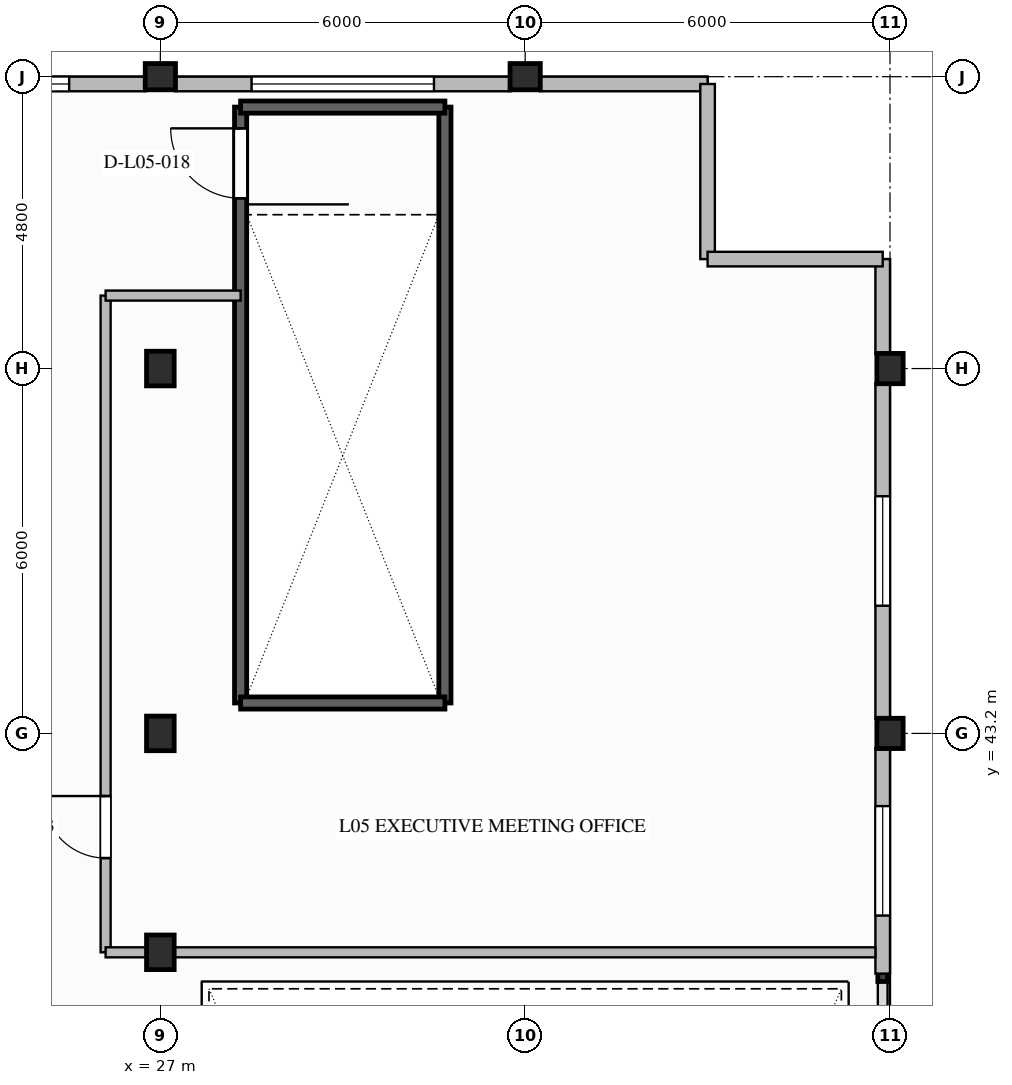
"""IFC4 building model, lengths in metres.
Left out: names, types, materials, properties, quantities, classifications, styles, units other than length and angle.
Written with IfcOpenShell. Run it as: python <this file> out.ifc"""

import sys

from ifc_helpers import new_model, si_unit, direction, frame, frame_2d, origin, origin_2d, place, context, subcontext, project, spatial, rectangle, i_section, extrude, element, fill, save


model = new_model("IFC4")
c1 = context("Model", 3, precision=1e-05, world=origin(), true_north=direction((0.0, 1.0)))
c2 = subcontext(c1, "Body", "Model", "MODEL_VIEW")
j1 = project(units=[si_unit("LENGTHUNIT", "METRE"), si_unit("PLANEANGLEUNIT", "RADIAN")], contexts=[c1])
p1 = place(None, origin())
s1 = spatial("IfcSite", under=j1, at=p1, CompositionType="ELEMENT")
p2 = place(p1, origin())
s2 = spatial("IfcBuilding", under=s1, at=p2, CompositionType="ELEMENT")
p3 = place(p2, frame((0.0, 0.0, 27.6)))
s3 = spatial("IfcBuildingStorey", under=s2, at=p3, CompositionType="ELEMENT", Elevation=27.6)
for number, where, z_axis, x_axis in (
    (1, (39.0, 43.2, 0.0), (0.0, 0.0, 1.0), (1.0, 0.0, 0.0)),
    (2, (39.0, 49.2, 0.0), (0.0, 0.0, 1.0), (1.0, 0.0, 0.0)),
    (3, (27.0, 54.0, 0.0), (0.0, 0.0, 1.0), (0.0, 1.0, 0.0)),
    (4, (33.0, 54.0, 0.0), (0.0, 0.0, 1.0), (0.0, 1.0, 0.0)),
):
    element("IfcColumn", number, at=place(p3, frame(where, z_axis=z_axis, x_axis=x_axis)), inside=s3, PredefinedType="COLUMN", context=c2, shape_type="SweptSolid", body=[
        extrude(i_section(OverallWidth=0.432, OverallDepth=0.498, WebThickness=0.056, FlangeThickness=0.089, FilletRadius=0.03, at=origin_2d()), origin(), (0.0, 0.0, 1.0), 5.32),
    ])
for number, where, z_axis, x_axis in (
    (5, (27.0, 39.6, 0.0), (0.0, 0.0, 1.0), (1.0, 0.0, 0.0)),
    (6, (27.0, 43.2, 0.0), (0.0, 0.0, 1.0), (1.0, 0.0, 0.0)),
    (7, (27.0, 49.2, 0.0), (0.0, 0.0, 1.0), (1.0, 0.0, 0.0)),
):
    element("IfcColumn", number, at=place(p3, frame(where, z_axis=z_axis, x_axis=x_axis)), inside=s3, PredefinedType="COLUMN", context=c2, shape_type="SweptSolid", body=[
        extrude(i_section(OverallWidth=0.454, OverallDepth=0.569, WebThickness=0.078, FlangeThickness=0.125, FilletRadius=0.03, at=origin_2d()), origin(), (0.0, 0.0, 1.0), 5.32),
    ])
p4 = place(p3, frame((38.88, 42.959, 0.0), z_axis=(0.0, 0.0, 1.0), x_axis=(0.0, -1.0, 0.0)))
e8 = element("IfcWall", 8, at=p4, inside=s3, PredefinedType="STANDARD", context=c2, shape_type="SweptSolid", body=[
    extrude(rectangle(XDim=3.709, YDim=0.24, at=frame_2d((1.854, 0.0))), origin(), (0.0, 0.0, 1.0), 4.625),
])
p5 = place(p4, frame((0.955, 0.0, 0.85)))
e9 = element("IfcOpeningElement", 9, at=p5, cuts=e8, PredefinedType="OPENING", context=c2, shape_type="SweptSolid", body=[
    extrude(rectangle(XDim=1.8, YDim=2.2, at=frame_2d((0.9, 1.1))), frame((0.0, 0.13, 0.0), z_axis=(0.0, -1.0, 0.0), x_axis=(1.0, 0.0, 0.0)), (0.0, 0.0, 1.0), 0.26),
])
p6 = place(p3, frame((38.88, 48.959, 0.0), z_axis=(0.0, 0.0, 1.0), x_axis=(0.0, -1.0, 0.0)))
e10 = element("IfcWall", 10, at=p6, inside=s3, PredefinedType="STANDARD", context=c2, shape_type="SweptSolid", body=[
    extrude(rectangle(XDim=5.518, YDim=0.24, at=frame_2d((2.759, 0.0))), origin(), (0.0, 0.0, 1.0), 4.625),
])
p7 = place(p6, frame((1.859, 0.0, 0.85)))
e11 = element("IfcOpeningElement", 11, at=p7, cuts=e10, PredefinedType="OPENING", context=c2, shape_type="SweptSolid", body=[
    extrude(rectangle(XDim=1.8, YDim=2.2, at=frame_2d((0.9, 1.1))), frame((0.0, 0.13, 0.0), z_axis=(0.0, -1.0, 0.0), x_axis=(1.0, 0.0, 0.0)), (0.0, 0.0, 1.0), 0.26),
])
p8 = place(p3, frame((38.88, 51.0, 0.0), z_axis=(0.0, 0.0, 1.0), x_axis=(0.0, -1.0, 0.0)))
e12 = element("IfcWall", 12, at=p8, inside=s3, PredefinedType="STANDARD", context=c2, shape_type="SweptSolid", body=[
    extrude(rectangle(XDim=1.559, YDim=0.24, at=frame_2d((0.78, 0.0))), origin(), (0.0, 0.0, 1.0), 5.32),
])
p9 = place(p3, frame((22.441, 53.88, 0.0), z_axis=(0.0, 0.0, 1.0), x_axis=(1.0, 0.0, 0.0)))
e13 = element("IfcWall", 13, at=p9, inside=s3, PredefinedType="STANDARD", context=c2, shape_type="SweptSolid", body=[
    extrude(rectangle(XDim=4.318, YDim=0.24, at=frame_2d((2.159, 0.0))), origin(), (0.0, 0.0, 1.0), 4.625),
])
p10 = place(p9, frame((1.259, 0.0, 0.65)))
e14 = element("IfcOpeningElement", 14, at=p10, cuts=e13, PredefinedType="OPENING", context=c2, shape_type="SweptSolid", body=[
    extrude(rectangle(XDim=1.8, YDim=2.2, at=frame_2d((0.9, 1.1))), frame((0.0, 0.13, 0.0), z_axis=(0.0, -1.0, 0.0), x_axis=(1.0, 0.0, 0.0)), (0.0, 0.0, 1.0), 0.26),
])
p11 = place(p3, frame((27.241, 53.88, 0.0), z_axis=(0.0, 0.0, 1.0), x_axis=(1.0, 0.0, 0.0)))
e15 = element("IfcWall", 15, at=p11, inside=s3, PredefinedType="STANDARD", context=c2, shape_type="SweptSolid", body=[
    extrude(rectangle(XDim=5.518, YDim=0.24, at=frame_2d((2.759, 0.0))), origin(), (0.0, 0.0, 1.0), 4.625),
])
p12 = place(p11, frame((1.259, 0.0, 0.65)))
e16 = element("IfcOpeningElement", 16, at=p12, cuts=e15, PredefinedType="OPENING", context=c2, shape_type="SweptSolid", body=[
    extrude(rectangle(XDim=3.0, YDim=2.2, at=frame_2d((1.5, 1.1))), frame((0.0, 0.13, 0.0), z_axis=(0.0, -1.0, 0.0), x_axis=(1.0, 0.0, 0.0)), (0.0, 0.0, 1.0), 0.26),
])
p13 = place(p3, frame((33.241, 53.88, 0.0), z_axis=(0.0, 0.0, 1.0), x_axis=(1.0, 0.0, 0.0)))
e17 = element("IfcWall", 17, at=p13, inside=s3, PredefinedType="STANDARD", context=c2, shape_type="SweptSolid", body=[
    extrude(rectangle(XDim=2.759, YDim=0.24, at=frame_2d((1.379, 0.0))), origin(), (0.0, 0.0, 1.0), 5.32),
])
for number, where, z_axis, x_axis in (
    (18, (36.0, 53.88, 0.0), (0.0, 0.0, 1.0), (0.0, -1.0, 0.0)),
    (19, (36.0, 51.0, 0.0), (0.0, 0.0, 1.0), (1.0, 0.0, 0.0)),
):
    element("IfcWall", number, at=place(p3, frame(where, z_axis=z_axis, x_axis=x_axis)), inside=s3, PredefinedType="STANDARD", context=c2, shape_type="SweptSolid", body=[
        extrude(rectangle(XDim=2.88, YDim=0.24, at=frame_2d((1.44, 0.0))), origin(), (0.0, 0.0, 1.0), 5.32),
    ])
p14 = place(p3, frame((28.32, 43.7, 0.0), z_axis=(0.0, 0.0, 1.0), x_axis=(0.0, 1.0, 0.0)))
e20 = element("IfcWall", 20, at=p14, inside=s3, PredefinedType="SOLIDWALL", context=c2, shape_type="SweptSolid", body=[
    extrude(rectangle(XDim=9.8, YDim=0.2, at=frame_2d((4.9, 0.0))), origin(), (0.0, 0.0, 1.0), 5.32),
])
p15 = place(p14, frame((8.3, 0.0, 0.0)))
e21 = element("IfcOpeningElement", 21, at=p15, cuts=e20, PredefinedType="OPENING", context=c2, shape_type="SweptSolid", body=[
    extrude(rectangle(XDim=1.15, YDim=2.15, at=frame_2d((0.575, 1.075))), frame((0.0, 0.11, 0.0), z_axis=(0.0, -1.0, 0.0), x_axis=(1.0, 0.0, 0.0)), (0.0, 0.0, 1.0), 0.22),
])
p16 = place(p3, frame((31.68, 53.5, 0.0), z_axis=(0.0, 0.0, 1.0), x_axis=(0.0, -1.0, 0.0)))
e22 = element("IfcWall", 22, at=p16, inside=s3, PredefinedType="SOLIDWALL", context=c2, shape_type="SweptSolid", body=[
    extrude(rectangle(XDim=9.8, YDim=0.2, at=frame_2d((4.9, 0.0))), origin(), (0.0, 0.0, 1.0), 5.32),
])
for number, where, z_axis, x_axis in (
    (23, (28.32, 43.7, 0.0), (0.0, 0.0, 1.0), (1.0, 0.0, 0.0)),
    (24, (31.68, 53.5, 0.0), (0.0, 0.0, 1.0), (-1.0, 0.0, 0.0)),
):
    element("IfcWall", number, at=place(p3, frame(where, z_axis=z_axis, x_axis=x_axis)), inside=s3, PredefinedType="SOLIDWALL", context=c2, shape_type="SweptSolid", body=[
        extrude(rectangle(XDim=3.36, YDim=0.2, at=frame_2d((1.68, 0.0))), origin(), (0.0, 0.0, 1.0), 5.32),
    ])
p17 = place(p3, frame((26.1, 39.6, 0.0), z_axis=(0.0, 0.0, 1.0), x_axis=(0.0, 1.0, 0.0)))
e25 = element("IfcWall", 25, at=p17, inside=s3, PredefinedType="PARTITIONING", context=c2, shape_type="SweptSolid", body=[
    extrude(rectangle(XDim=10.8, YDim=0.165, at=frame_2d((5.4, 0.0))), origin(), (0.0, 0.0, 1.0), 5.32),
])
p18 = place(p17, frame((1.55, 0.0, 0.0)))
e26 = element("IfcOpeningElement", 26, at=p18, cuts=e25, PredefinedType="OPENING", context=c2, shape_type="SweptSolid", body=[
    extrude(rectangle(XDim=1.02, YDim=2.15, at=frame_2d((0.51, 1.075))), frame((0.0, 0.093, 0.0), z_axis=(0.0, -1.0, 0.0), x_axis=(1.0, 0.0, 0.0)), (0.0, 0.0, 1.0), 0.185),
])
p19 = place(p3, frame((26.1, 50.4, 0.0), z_axis=(0.0, 0.0, 1.0), x_axis=(1.0, 0.0, 0.0)))
e27 = element("IfcWall", 27, at=p19, inside=s3, PredefinedType="PARTITIONING", context=c2, shape_type="SweptSolid", body=[
    extrude(rectangle(XDim=2.22, YDim=0.165, at=frame_2d((1.11, 0.0))), origin(), (0.0, 0.0, 1.0), 5.32),
])
p20 = place(p3, frame((26.1, 39.6, 0.0), z_axis=(0.0, 0.0, 1.0), x_axis=(1.0, 0.0, 0.0)))
e28 = element("IfcWall", 28, at=p20, inside=s3, PredefinedType="PARTITIONING", context=c2, shape_type="SweptSolid", body=[
    extrude(rectangle(XDim=12.66, YDim=0.165, at=frame_2d((6.33, 0.0))), origin(), (0.0, 0.0, 1.0), 4.532),
])
p21 = place(p5, origin())
e29 = element("IfcWindow", 29, at=p21, inside=s3, PartitioningType="SINGLE_PANEL", PredefinedType="WINDOW", context=c2, shape_type="SweptSolid", body=[
    extrude(rectangle(XDim=1.8, YDim=2.2, at=frame_2d((0.9, 1.1))), frame((0.0, 0.03, 0.0), z_axis=(0.0, -1.0, 0.0), x_axis=(1.0, 0.0, 0.0)), (0.0, 0.0, 1.0), 0.06),
])
fill(e9, e29)
p22 = place(p7, origin())
e30 = element("IfcWindow", 30, at=p22, inside=s3, PartitioningType="SINGLE_PANEL", PredefinedType="WINDOW", context=c2, shape_type="SweptSolid", body=[
    extrude(rectangle(XDim=1.8, YDim=2.2, at=frame_2d((0.9, 1.1))), frame((0.0, 0.03, 0.0), z_axis=(0.0, -1.0, 0.0), x_axis=(1.0, 0.0, 0.0)), (0.0, 0.0, 1.0), 0.06),
])
fill(e11, e30)
p23 = place(p10, origin())
e31 = element("IfcWindow", 31, at=p23, inside=s3, PartitioningType="SINGLE_PANEL", PredefinedType="WINDOW", context=c2, shape_type="SweptSolid", body=[
    extrude(rectangle(XDim=1.8, YDim=2.2, at=frame_2d((0.9, 1.1))), frame((0.0, 0.03, 0.0), z_axis=(0.0, -1.0, 0.0), x_axis=(1.0, 0.0, 0.0)), (0.0, 0.0, 1.0), 0.06),
])
fill(e14, e31)
p24 = place(p12, origin())
e32 = element("IfcWindow", 32, at=p24, inside=s3, PartitioningType="SINGLE_PANEL", PredefinedType="WINDOW", context=c2, shape_type="SweptSolid", body=[
    extrude(rectangle(XDim=3.0, YDim=2.2, at=frame_2d((1.5, 1.1))), frame((0.0, 0.03, 0.0), z_axis=(0.0, -1.0, 0.0), x_axis=(1.0, 0.0, 0.0)), (0.0, 0.0, 1.0), 0.06),
])
fill(e16, e32)
p25 = place(p15, origin())
e33 = element("IfcDoor", 33, at=p25, inside=s3, OperationType="SINGLE_SWING_RIGHT", PredefinedType="DOOR", context=c2, shape_type="SweptSolid", body=[
    extrude(rectangle(XDim=1.15, YDim=2.15, at=frame_2d((0.575, 1.075))), frame((0.0, 0.025, 0.0), z_axis=(0.0, -1.0, 0.0), x_axis=(1.0, 0.0, 0.0)), (0.0, 0.0, 1.0), 0.05),
])
fill(e21, e33)
p26 = place(p18, origin())
e34 = element("IfcDoor", 34, at=p26, inside=s3, OperationType="SINGLE_SWING_RIGHT", PredefinedType="DOOR", context=c2, shape_type="SweptSolid", body=[
    extrude(rectangle(XDim=1.02, YDim=2.15, at=frame_2d((0.51, 1.075))), frame((0.0, 0.025, 0.0), z_axis=(0.0, -1.0, 0.0), x_axis=(1.0, 0.0, 0.0)), (0.0, 0.0, 1.0), 0.05),
])
fill(e26, e34)
save(model, sys.argv[1])
